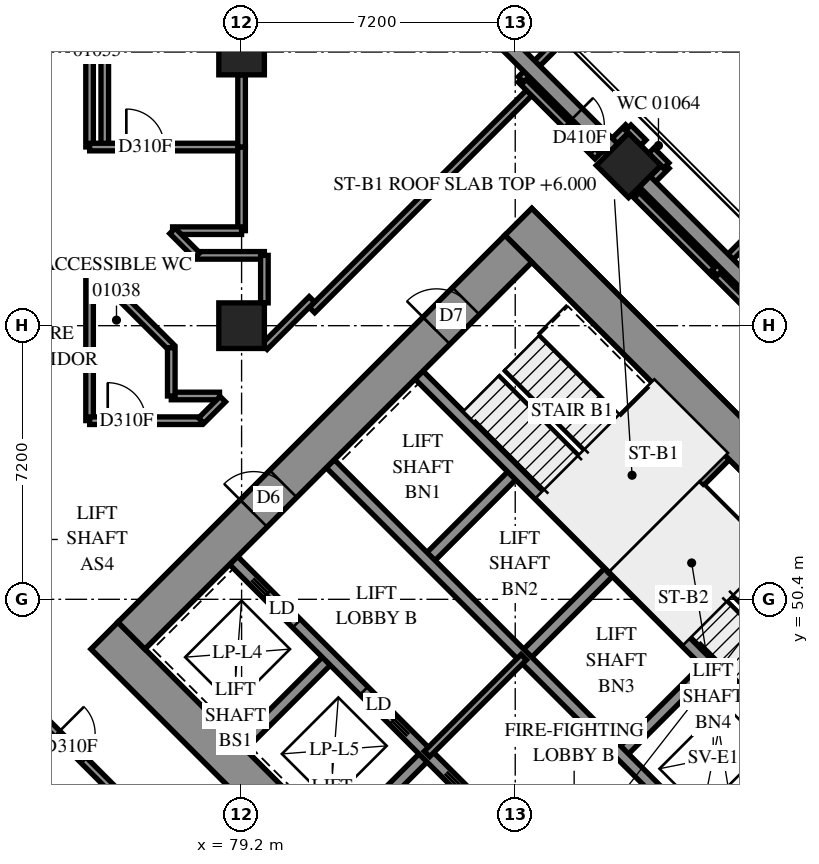
"""IFC4 building model, lengths in metres.
Left out: names, types, materials, properties, quantities, classifications, styles, units other than length and angle.
Written with IfcOpenShell. Run it as: python <this file> out.ifc"""

import sys

from ifc_helpers import new_model, si_unit, direction, frame, frame_2d, origin, origin_2d, place, context, subcontext, project, spatial, rectangle, extrude, element, fill, save


model = new_model("IFC4")
c1 = context("Model", 3, precision=1e-05, world=origin(), true_north=direction((0.0, 1.0)))
c2 = subcontext(c1, "Body", "Model", "MODEL_VIEW")
j1 = project(units=[si_unit("LENGTHUNIT", "METRE"), si_unit("PLANEANGLEUNIT", "RADIAN")], contexts=[c1])
p1 = place(None, origin())
s1 = spatial("IfcSite", under=j1, at=p1, CompositionType="ELEMENT")
p2 = place(p1, origin())
s2 = spatial("IfcBuilding", under=s1, at=p2, CompositionType="ELEMENT")
p3 = place(p2, frame((0.0, 0.0, 6.0)))
s3 = spatial("IfcBuildingStorey", under=s2, at=p3, CompositionType="ELEMENT", Elevation=6.0)
for number, where, z_axis, x_axis in (
    (1, (79.2, 57.6, 0.0), (0.0, 0.0, 1.0), (1.0, 0.0, 0.0)),
    (2, (79.2, 64.8, 0.0), (0.0, 0.0, 1.0), (1.0, 0.0, 0.0)),
    (3, (89.382, 61.818, 0.0), (0.0, 0.0, 1.0), (0.707, -0.707, 0.0)),
):
    element("IfcColumn", number, at=place(p3, frame(where, z_axis=z_axis, x_axis=x_axis)), inside=s3, PredefinedType="COLUMN", context=c2, shape_type="SweptSolid", body=[
        extrude(rectangle(XDim=1.2, YDim=1.2, at=origin_2d()), origin(), (0.0, 0.0, 1.0), 3.8),
    ])
p4 = place(p3, frame((75.594, 49.443, -0.4), z_axis=(0.0, 0.0, 1.0), x_axis=(0.7071037324, -0.70710983, 0.0)))
e4 = element("IfcWall", 4, at=p4, inside=s3, PredefinedType="SHEAR", context=c2, shape_type="SweptSolid", body=[
    extrude(rectangle(XDim=16.4, YDim=1.0, at=frame_2d((8.2, 0.0))), origin(), (0.0, 0.0, 1.0), 3.5),
])
p5 = place(p3, frame((86.483, 60.333, -0.4), z_axis=(0.0, 0.0, 1.0), x_axis=(0.70710983, -0.7071037324, 0.0)))
e5 = element("IfcWall", 5, at=p5, inside=s3, PredefinedType="SHEAR", context=c2, shape_type="SweptSolid", body=[
    extrude(rectangle(XDim=16.4, YDim=1.0, at=frame_2d((8.2, 0.0))), origin(), (0.0, 0.0, 1.0), 3.5),
])
p6 = place(p5, frame((11.0, 0.0, 0.4)))
e6 = element("IfcOpeningElement", 6, at=p6, cuts=e5, PredefinedType="OPENING", context=c2, shape_type="SweptSolid", body=[
    extrude(rectangle(XDim=0.8, YDim=2.1, at=frame_2d((0.4, 1.05))), frame((0.0, 0.51, 0.0), z_axis=(0.0, -1.0, 0.0), x_axis=(1.0, 0.0, 0.0)), (0.0, 0.0, 1.0), 1.02),
])
p7 = place(p3, frame((76.301, 49.443, -0.4), z_axis=(0.0, 0.0, 1.0), x_axis=(0.7071067812, 0.7071067812, 0.0)))
e7 = element("IfcWall", 7, at=p7, inside=s3, PredefinedType="SHEAR", context=c2, shape_type="SweptSolid", body=[
    extrude(rectangle(XDim=14.4, YDim=1.0, at=frame_2d((7.2, 0.0))), origin(), (0.0, 0.0, 1.0), 3.5),
])
p8 = place(p7, frame((4.55, 0.0, 0.4)))
e8 = element("IfcOpeningElement", 8, at=p8, cuts=e7, PredefinedType="OPENING", context=c2, shape_type="SweptSolid", body=[
    extrude(rectangle(XDim=1.1, YDim=2.1, at=frame_2d((0.55, 1.05))), frame((0.0, 0.51, 0.0), z_axis=(0.0, -1.0, 0.0), x_axis=(1.0, 0.0, 0.0)), (0.0, 0.0, 1.0), 1.02),
])
p9 = place(p7, frame((11.35, 0.0, 0.4)))
e9 = element("IfcOpeningElement", 9, at=p9, cuts=e7, PredefinedType="OPENING", context=c2, shape_type="SweptSolid", body=[
    extrude(rectangle(XDim=1.1, YDim=2.1, at=frame_2d((0.55, 1.05))), frame((0.0, 0.51, 0.0), z_axis=(0.0, -1.0, 0.0), x_axis=(1.0, 0.0, 0.0)), (0.0, 0.0, 1.0), 1.02),
])
p10 = place(p3, frame((87.19, 38.554, -0.4), z_axis=(0.0, 0.0, 1.0), x_axis=(0.707103309, 0.7071102534, 0.0)))
e10 = element("IfcWall", 10, at=p10, inside=s3, PredefinedType="SHEAR", context=c2, shape_type="SweptSolid", body=[
    extrude(rectangle(XDim=14.4, YDim=1.0, at=frame_2d((7.2, 0.0))), origin(), (0.0, 0.0, 1.0), 3.5),
])
p11 = place(p10, frame((4.55, 0.0, 0.4)))
e11 = element("IfcOpeningElement", 11, at=p11, cuts=e10, PredefinedType="OPENING", context=c2, shape_type="SweptSolid", body=[
    extrude(rectangle(XDim=1.1, YDim=2.1, at=frame_2d((0.55, 1.05))), frame((0.0, 0.51, 0.0), z_axis=(0.0, -1.0, 0.0), x_axis=(1.0, 0.0, 0.0)), (0.0, 0.0, 1.0), 1.02),
])
p12 = place(p10, frame((11.35, 0.0, 0.4)))
e12 = element("IfcOpeningElement", 12, at=p12, cuts=e10, PredefinedType="OPENING", context=c2, shape_type="SweptSolid", body=[
    extrude(rectangle(XDim=1.1, YDim=2.1, at=frame_2d((0.55, 1.05))), frame((0.0, 0.51, 0.0), z_axis=(0.0, -1.0, 0.0), x_axis=(1.0, 0.0, 0.0)), (0.0, 0.0, 1.0), 1.02),
])
for number, where, z_axis, x_axis in (
    (13, (79.2, 46.544, 0.0), (0.0, 0.0, 1.0), (0.707, 0.707, 0.0)),
    (14, (84.079, 51.423, 0.0), (0.0, 0.0, 1.0), (0.707, 0.707, 0.0)),
):
    element("IfcWall", number, at=place(p3, frame(where, z_axis=z_axis, x_axis=x_axis)), inside=s3, PredefinedType="SOLIDWALL", context=c2, shape_type="SweptSolid", body=[
        extrude(rectangle(XDim=3.3, YDim=0.3, at=frame_2d((1.65, 0.0))), origin(), (0.0, 0.0, 1.0), 3.8),
    ])
p13 = place(p3, frame((81.746, 43.999, 0.0), z_axis=(0.0, 0.0, 1.0), x_axis=(0.7071067812, 0.7071067812, 0.0)))
e15 = element("IfcWall", 15, at=p13, inside=s3, PredefinedType="SOLIDWALL", context=c2, shape_type="SweptSolid", body=[
    extrude(rectangle(XDim=3.3, YDim=0.3, at=frame_2d((1.65, 0.0))), origin(), (0.0, 0.0, 1.0), 3.8),
])
for number, where, z_axis, x_axis in (
    (16, (86.625, 48.878, 0.0), (0.0, 0.0, 1.0), (0.707, 0.707, 0.0)),
    (17, (89.17, 46.332, 0.0), (0.0, 0.0, 1.0), (0.707, 0.707, 0.0)),
):
    element("IfcWall", number, at=place(p3, frame(where, z_axis=z_axis, x_axis=x_axis)), inside=s3, PredefinedType="SOLIDWALL", context=c2, shape_type="SweptSolid", body=[
        extrude(rectangle(XDim=3.3, YDim=0.3, at=frame_2d((1.65, 0.0))), origin(), (0.0, 0.0, 1.0), 3.8),
    ])
p14 = place(p3, frame((78.988, 51.423, 0.0), z_axis=(0.0, 0.0, 1.0), x_axis=(0.7071067812, -0.7071067812, 0.0)))
e18 = element("IfcWall", 18, at=p14, inside=s3, PredefinedType="SOLIDWALL", context=c2, shape_type="SweptSolid", body=[
    extrude(rectangle(XDim=14.4, YDim=0.3, at=frame_2d((7.2, 0.0))), origin(), (0.0, 0.0, 1.0), 3.8),
])
p15 = place(p14, frame((1.25, 0.0, 0.0)))
e19 = element("IfcOpeningElement", 19, at=p15, cuts=e18, PredefinedType="OPENING", context=c2, shape_type="SweptSolid", body=[
    extrude(rectangle(XDim=1.1, YDim=2.1, at=frame_2d((0.55, 1.05))), frame((0.0, 0.16, 0.0), z_axis=(0.0, -1.0, 0.0), x_axis=(1.0, 0.0, 0.0)), (0.0, 0.0, 1.0), 0.32),
])
p16 = place(p14, frame((4.85, 0.0, 0.0)))
e20 = element("IfcOpeningElement", 20, at=p16, cuts=e18, PredefinedType="OPENING", context=c2, shape_type="SweptSolid", body=[
    extrude(rectangle(XDim=1.1, YDim=2.1, at=frame_2d((0.55, 1.05))), frame((0.0, 0.16, 0.0), z_axis=(0.0, -1.0, 0.0), x_axis=(1.0, 0.0, 0.0)), (0.0, 0.0, 1.0), 0.32),
])
p17 = place(p14, frame((8.45, 0.0, 0.0)))
e21 = element("IfcOpeningElement", 21, at=p17, cuts=e18, PredefinedType="OPENING", context=c2, shape_type="SweptSolid", body=[
    extrude(rectangle(XDim=1.1, YDim=2.1, at=frame_2d((0.55, 1.05))), frame((0.0, 0.16, 0.0), z_axis=(0.0, -1.0, 0.0), x_axis=(1.0, 0.0, 0.0)), (0.0, 0.0, 1.0), 0.32),
])
p18 = place(p14, frame((12.05, 0.0, 0.0)))
e22 = element("IfcOpeningElement", 22, at=p18, cuts=e18, PredefinedType="OPENING", context=c2, shape_type="SweptSolid", body=[
    extrude(rectangle(XDim=1.1, YDim=2.1, at=frame_2d((0.55, 1.05))), frame((0.0, 0.16, 0.0), z_axis=(0.0, -1.0, 0.0), x_axis=(1.0, 0.0, 0.0)), (0.0, 0.0, 1.0), 0.32),
])
p19 = place(p3, frame((81.534, 53.969, 0.0), z_axis=(0.0, 0.0, 1.0), x_axis=(0.707103309, -0.7071102534, 0.0)))
e23 = element("IfcWall", 23, at=p19, inside=s3, PredefinedType="SOLIDWALL", context=c2, shape_type="SweptSolid", body=[
    extrude(rectangle(XDim=14.4, YDim=0.3, at=frame_2d((7.2, 0.0))), origin(), (0.0, 0.0, 1.0), 3.8),
])
p20 = place(p19, frame((12.05, 0.0, 0.0)))
e24 = element("IfcOpeningElement", 24, at=p20, cuts=e23, PredefinedType="OPENING", context=c2, shape_type="SweptSolid", body=[
    extrude(rectangle(XDim=1.1, YDim=2.1, at=frame_2d((0.55, 1.05))), frame((0.0, 0.16, 0.0), z_axis=(0.0, -1.0, 0.0), x_axis=(1.0, 0.0, 0.0)), (0.0, 0.0, 1.0), 0.32),
])
for number, where, z_axis, x_axis in (
    (25, (83.867, 56.302, 0.0), (0.0, 0.0, 1.0), (0.707, -0.707, 0.0)),
    (26, (88.958, 51.211, 0.0), (0.0, 0.0, 1.0), (0.707, -0.707, 0.0)),
):
    element("IfcWall", number, at=place(p3, frame(where, z_axis=z_axis, x_axis=x_axis)), inside=s3, PredefinedType="SOLIDWALL", context=c2, shape_type="SweptSolid", body=[
        extrude(rectangle(XDim=7.2, YDim=0.3, at=frame_2d((3.6, 0.0))), origin(), (0.0, 0.0, 1.0), 3.8),
    ])
p21 = place(p3, frame((88.958, 51.211, 0.0), z_axis=(0.0, 0.0, 1.0), x_axis=(0.7071067812, 0.7071067812, 0.0)))
e27 = element("IfcWall", 27, at=p21, inside=s3, PredefinedType="SOLIDWALL", context=c2, shape_type="SweptSolid", body=[
    extrude(rectangle(XDim=4.2, YDim=0.3, at=frame_2d((2.1, 0.0))), origin(), (0.0, 0.0, 1.0), 3.8),
])
p22 = place(p3, frame((91.313, 53.354, 0.0), z_axis=(0.0, 0.0, 1.0), x_axis=(0.7071147811, -0.7070987812, 0.0)))
e28 = element("IfcWall", 28, at=p22, inside=s3, PredefinedType="PARTITIONING", context=c2, shape_type="SweptSolid", body=[
    extrude(rectangle(XDim=6.25, YDim=0.15, at=frame_2d((3.125, 0.0))), origin(), (0.0, 0.0, 1.0), 3.8),
])
p23 = place(p3, frame((84.079, 46.332, 0.0), z_axis=(0.0, 0.0, 1.0), x_axis=(0.7071067812, 0.7071067812, 0.0)))
e29 = element("IfcWall", 29, at=p23, inside=s3, PredefinedType="PARTITIONING", context=c2, shape_type="SweptSolid", body=[
    extrude(rectangle(XDim=3.6, YDim=0.2, at=frame_2d((1.8, 0.0))), origin(), (0.0, 0.0, 1.0), 3.8),
])
p24 = place(p3, frame((75.6, 62.3, 0.0), z_axis=(0.0, 0.0, 1.0), x_axis=(0.0, 1.0, 0.0)))
e30 = element("IfcWall", 30, at=p24, inside=s3, PredefinedType="PARTITIONING", context=c2, shape_type="SweptSolid", body=[
    extrude(rectangle(XDim=10.7, YDim=0.2, at=frame_2d((5.35, 0.0))), origin(), (0.0, 0.0, 1.0), 3.8),
])
p25 = place(p3, frame((81.053, 58.011, 0.0), z_axis=(0.0, 0.0, 1.0), x_axis=(0.7069845395, 0.7072290017, 0.0)))
e31 = element("IfcWall", 31, at=p25, inside=s3, PredefinedType="PARTITIONING", context=c2, shape_type="SweptSolid", body=[
    extrude(rectangle(XDim=8.181, YDim=0.2, at=frame_2d((4.091, 0.0))), origin(), (0.0, 0.0, 1.0), 3.8),
])
p26 = place(p3, frame((75.2, 62.302, 0.0), z_axis=(0.0, 0.0, 1.0), x_axis=(0.0, 1.0, 0.0)))
e32 = element("IfcWall", 32, at=p26, inside=s3, PredefinedType="PARTITIONING", context=c2, shape_type="SweptSolid", body=[
    extrude(rectangle(XDim=5.698, YDim=0.2, at=frame_2d((2.849, 0.0))), origin(), (0.0, 0.0, 1.0), 3.8),
])
p27 = place(p3, frame((74.015, 47.197, 0.0), z_axis=(0.0, 0.0, 1.0), x_axis=(0.7071067812, -0.7071067812, 0.0)))
e33 = element("IfcWall", 33, at=p27, inside=s3, PredefinedType="PARTITIONING", context=c2, shape_type="SweptSolid", body=[
    extrude(rectangle(XDim=4.712, YDim=0.2, at=frame_2d((2.356, 0.0))), origin(), (0.0, 0.0, 1.0), 3.8),
])
p28 = place(p27, frame((0.468, 0.0, 0.0)))
e34 = element("IfcOpeningElement", 34, at=p28, cuts=e33, PredefinedType="OPENING", context=c2, shape_type="SweptSolid", body=[
    extrude(rectangle(XDim=1.0, YDim=2.1, at=frame_2d((0.5, 1.05))), frame((0.0, 0.11, 0.0), z_axis=(0.0, -1.0, 0.0), x_axis=(1.0, 0.0, 0.0)), (0.0, 0.0, 1.0), 0.22),
])
p29 = place(p3, frame((75.2, 55.102, 0.0), z_axis=(0.0, 0.0, 1.0), x_axis=(0.0, 1.0, 0.0)))
e35 = element("IfcWall", 35, at=p29, inside=s3, PredefinedType="PARTITIONING", context=c2, shape_type="SweptSolid", body=[
    extrude(rectangle(XDim=4.066, YDim=0.2, at=frame_2d((2.033, 0.0))), origin(), (0.0, 0.0, 1.0), 3.8),
])
p30 = place(p3, frame((75.202, 62.3, 0.0), z_axis=(0.0, 0.0, 1.0), x_axis=(1.0, 0.0, 0.0)))
e36 = element("IfcWall", 36, at=p30, inside=s3, PredefinedType="PARTITIONING", context=c2, shape_type="SweptSolid", body=[
    extrude(rectangle(XDim=3.998, YDim=0.2, at=frame_2d((1.999, 0.0))), origin(), (0.0, 0.0, 1.0), 3.8),
])
p31 = place(p30, frame((0.966, 0.0, 0.0)))
e37 = element("IfcOpeningElement", 37, at=p31, cuts=e36, PredefinedType="OPENING", context=c2, shape_type="SweptSolid", body=[
    extrude(rectangle(XDim=1.0, YDim=2.1, at=frame_2d((0.5, 1.05))), frame((0.0, 0.11, 0.0), z_axis=(0.0, -1.0, 0.0), x_axis=(1.0, 0.0, 0.0)), (0.0, 0.0, 1.0), 0.22),
])
p32 = place(p3, frame((75.202, 55.1, 0.0), z_axis=(0.0, 0.0, 1.0), x_axis=(1.0, 0.0, 0.0)))
e38 = element("IfcWall", 38, at=p32, inside=s3, PredefinedType="PARTITIONING", context=c2, shape_type="SweptSolid", body=[
    extrude(rectangle(XDim=2.936, YDim=0.2, at=frame_2d((1.468, 0.0))), origin(), (0.0, 0.0, 1.0), 3.8),
])
p33 = place(p32, frame((0.475, 0.0, 0.0)))
e39 = element("IfcOpeningElement", 39, at=p33, cuts=e38, PredefinedType="OPENING", context=c2, shape_type="SweptSolid", body=[
    extrude(rectangle(XDim=1.0, YDim=2.1, at=frame_2d((0.5, 1.05))), frame((0.0, 0.11, 0.0), z_axis=(0.0, -1.0, 0.0), x_axis=(1.0, 0.0, 0.0)), (0.0, 0.0, 1.0), 0.22),
])
p34 = place(p3, frame((89.595, 61.033, 0.0), z_axis=(0.0, 0.0, 1.0), x_axis=(0.7074521324, -0.7067612612, 0.0)))
e40 = element("IfcWall", 40, at=p34, inside=s3, PredefinedType="PARTITIONING", context=c2, shape_type="SweptSolid", body=[
    extrude(rectangle(XDim=2.895, YDim=0.2, at=frame_2d((1.447, 0.0))), origin(), (0.0, 0.0, 1.0), 3.8),
])
p35 = place(p3, frame((91.648, 58.992, 0.0), z_axis=(0.0, 0.0, 1.0), x_axis=(0.7067612612, -0.7074521324, 0.0)))
e41 = element("IfcWall", 41, at=p35, inside=s3, PredefinedType="PARTITIONING", context=c2, shape_type="SweptSolid", body=[
    extrude(rectangle(XDim=2.895, YDim=0.2, at=frame_2d((1.447, 0.0))), origin(), (0.0, 0.0, 1.0), 3.8),
])
p36 = place(p35, frame((1.677, 0.0, 0.0)))
e42 = element("IfcOpeningElement", 42, at=p36, cuts=e41, PredefinedType="OPENING", context=c2, shape_type="SweptSolid", body=[
    extrude(rectangle(XDim=1.0, YDim=2.1, at=frame_2d((0.5, 1.05))), frame((0.0, 0.11, 0.0), z_axis=(0.0, -1.0, 0.0), x_axis=(1.0, 0.0, 0.0)), (0.0, 0.0, 1.0), 0.22),
])
p37 = place(p3, frame((86.551, 64.077, 0.0), z_axis=(0.0, 0.0, 1.0), x_axis=(0.7071067812, -0.7071067812, 0.0)))
e43 = element("IfcWall", 43, at=p37, inside=s3, PredefinedType="PARTITIONING", context=c2, shape_type="SweptSolid", body=[
    extrude(rectangle(XDim=2.854, YDim=0.2, at=frame_2d((1.427, 0.0))), origin(), (0.0, 0.0, 1.0), 3.8),
])
p38 = place(p37, frame((1.685, 0.0, 0.0)))
e44 = element("IfcOpeningElement", 44, at=p38, cuts=e43, PredefinedType="OPENING", context=c2, shape_type="SweptSolid", body=[
    extrude(rectangle(XDim=1.0, YDim=2.1, at=frame_2d((0.5, 1.05))), frame((0.0, 0.11, 0.0), z_axis=(0.0, -1.0, 0.0), x_axis=(1.0, 0.0, 0.0)), (0.0, 0.0, 1.0), 0.22),
])
p39 = place(p3, frame((79.2, 60.1, 0.0), z_axis=(0.0, 0.0, 1.0), x_axis=(0.0, 1.0, 0.0)))
e45 = element("IfcWall", 45, at=p39, inside=s3, PredefinedType="PARTITIONING", context=c2, shape_type="SweptSolid", body=[
    extrude(rectangle(XDim=2.2, YDim=0.2, at=frame_2d((1.1, 0.0))), origin(), (0.0, 0.0, 1.0), 3.8),
])
p40 = place(p3, frame((75.879, 58.497, 0.0), z_axis=(0.0, 0.0, 1.0), x_axis=(0.7075866635, -0.706626573, 0.0)))
e46 = element("IfcWall", 46, at=p40, inside=s3, PredefinedType="PARTITIONING", context=c2, shape_type="SweptSolid", body=[
    extrude(rectangle(XDim=2.083, YDim=0.2, at=frame_2d((1.042, 0.0))), origin(), (0.0, 0.0, 1.0), 3.8),
])
p41 = place(p3, frame((79.2, 62.3, 0.0), z_axis=(0.0, 0.0, 1.0), x_axis=(0.0, 1.0, 0.0)))
e47 = element("IfcWall", 47, at=p41, inside=s3, PredefinedType="PARTITIONING", context=c2, shape_type="SweptSolid", body=[
    extrude(rectangle(XDim=1.9, YDim=0.2, at=frame_2d((0.95, 0.0))), origin(), (0.0, 0.0, 1.0), 3.8),
])
p42 = place(p3, frame((77.384, 60.1, 0.0), z_axis=(0.0, 0.0, 1.0), x_axis=(1.0, 0.0, 0.0)))
e48 = element("IfcWall", 48, at=p42, inside=s3, PredefinedType="PARTITIONING", context=c2, shape_type="SweptSolid", body=[
    extrude(rectangle(XDim=1.816, YDim=0.2, at=frame_2d((0.908, 0.0))), origin(), (0.0, 0.0, 1.0), 3.8),
])
p43 = place(p3, frame((78.032, 59.45, 0.0), z_axis=(0.0, 0.0, 1.0), x_axis=(1.0, 0.0, 0.0)))
e49 = element("IfcWall", 49, at=p43, inside=s3, PredefinedType="PARTITIONING", context=c2, shape_type="SweptSolid", body=[
    extrude(rectangle(XDim=1.768, YDim=0.2, at=frame_2d((0.884, 0.0))), origin(), (0.0, 0.0, 1.0), 3.8),
])
p44 = place(p3, frame((79.801, 57.047, 0.0), z_axis=(0.0, 0.0, 1.0), x_axis=(0.7071067812, 0.7071067812, 0.0)))
e50 = element("IfcWall", 50, at=p44, inside=s3, PredefinedType="PARTITIONING", context=c2, shape_type="SweptSolid", body=[
    extrude(rectangle(XDim=1.765, YDim=0.2, at=frame_2d((0.882, 0.0))), origin(), (0.0, 0.0, 1.0), 3.8),
])
p45 = place(p3, frame((86.551, 64.077, 0.0), z_axis=(0.0, 0.0, 1.0), x_axis=(0.7063607097, 0.7078520663, 0.0)))
e51 = element("IfcWall", 51, at=p45, inside=s3, PredefinedType="PARTITIONING", context=c2, shape_type="SweptSolid", body=[
    extrude(rectangle(XDim=1.475, YDim=0.2, at=frame_2d((0.738, 0.0))), origin(), (0.0, 0.0, 1.0), 3.8),
])
p46 = place(p3, frame((91.645, 58.991, 0.0), z_axis=(0.0, 0.0, 1.0), x_axis=(0.7071067812, 0.7071067812, 0.0)))
e52 = element("IfcWall", 52, at=p46, inside=s3, PredefinedType="PARTITIONING", context=c2, shape_type="SweptSolid", body=[
    extrude(rectangle(XDim=1.468, YDim=0.2, at=frame_2d((0.734, 0.0))), origin(), (0.0, 0.0, 1.0), 3.8),
])
for number, where, z_axis, x_axis in (
    (53, (77.35, 55.75, 0.0), (0.0, 0.0, 1.0), (1.0, 0.0, 0.0)),
    (54, (77.35, 55.75, 0.0), (0.0, 0.0, 1.0), (0.0, 1.0, 0.0)),
):
    element("IfcWall", number, at=place(p3, frame(where, z_axis=z_axis, x_axis=x_axis)), inside=s3, PredefinedType="PARTITIONING", context=c2, shape_type="SweptSolid", body=[
        extrude(rectangle(XDim=1.27, YDim=0.2, at=frame_2d((0.635, 0.0))), origin(), (0.0, 0.0, 1.0), 3.8),
    ])
p47 = place(p3, frame((79.8, 58.2, 0.0), z_axis=(0.0, 0.0, 1.0), x_axis=(0.0, 1.0, 0.0)))
e55 = element("IfcWall", 55, at=p47, inside=s3, PredefinedType="PARTITIONING", context=c2, shape_type="SweptSolid", body=[
    extrude(rectangle(XDim=1.25, YDim=0.2, at=frame_2d((0.625, 0.0))), origin(), (0.0, 0.0, 1.0), 3.8),
])
p48 = place(p3, frame((77.381, 60.095, 0.0), z_axis=(0.0, 0.0, 1.0), x_axis=(0.7071067812, -0.7071067812, 0.0)))
e56 = element("IfcWall", 56, at=p48, inside=s3, PredefinedType="PARTITIONING", context=c2, shape_type="SweptSolid", body=[
    extrude(rectangle(XDim=0.916, YDim=0.2, at=frame_2d((0.458, 0.0))), origin(), (0.0, 0.0, 1.0), 3.8),
])
p49 = place(p3, frame((78.139, 55.101, 0.0), z_axis=(0.0, 0.0, 1.0), x_axis=(0.7071067812, 0.7071067812, 0.0)))
e57 = element("IfcWall", 57, at=p49, inside=s3, PredefinedType="PARTITIONING", context=c2, shape_type="SweptSolid", body=[
    extrude(rectangle(XDim=0.8, YDim=0.2, at=frame_2d((0.4, 0.0))), origin(), (0.0, 0.0, 1.0), 3.8),
])
p50 = place(p3, frame((75.397, 58.967, 0.0), z_axis=(0.0, 0.0, 1.0), x_axis=(0.7071067812, -0.7071067812, 0.0)))
e58 = element("IfcWall", 58, at=p50, inside=s3, PredefinedType="PARTITIONING", context=c2, shape_type="SweptSolid", body=[
    extrude(rectangle(XDim=0.673, YDim=0.2, at=frame_2d((0.337, 0.0))), origin(), (0.0, 0.0, 1.0), 3.8),
])
for number, where, z_axis, x_axis in (
    (59, (89.985, 61.417, 0.0), (0.0, 0.0, 1.0), (0.707, 0.707, 0.0)),
    (60, (89.979, 62.205, 0.0), (0.0, 0.0, 1.0), (0.707, -0.707, 0.0)),
    (61, (88.981, 62.422, 0.0), (0.0, 0.0, 1.0), (0.707, 0.707, 0.0)),
    (62, (89.375, 62.809, 0.0), (0.0, 0.0, 1.0), (0.707, -0.707, 0.0)),
):
    element("IfcWall", number, at=place(p3, frame(where, z_axis=z_axis, x_axis=x_axis)), inside=s3, PredefinedType="PARTITIONING", context=c2, shape_type="SweptSolid", body=[
        extrude(rectangle(XDim=0.557, YDim=0.2, at=frame_2d((0.279, 0.0))), origin(), (0.0, 0.0, 1.0), 3.8),
    ])
p51 = place(p8, origin())
e63 = element("IfcDoor", 63, at=p51, inside=s3, OperationType="DOUBLE_DOOR_SINGLE_SWING", PredefinedType="DOOR", context=c2, shape_type="SweptSolid", body=[
    extrude(rectangle(XDim=1.1, YDim=2.1, at=frame_2d((0.55, 1.05))), frame((0.0, 0.025, 0.0), z_axis=(0.0, -1.0, 0.0), x_axis=(1.0, 0.0, 0.0)), (0.0, 0.0, 1.0), 0.05),
])
fill(e8, e63)
p52 = place(p9, origin())
e64 = element("IfcDoor", 64, at=p52, inside=s3, OperationType="SINGLE_SWING_LEFT", PredefinedType="DOOR", context=c2, shape_type="SweptSolid", body=[
    extrude(rectangle(XDim=1.1, YDim=2.1, at=frame_2d((0.55, 1.05))), frame((0.0, 0.025, 0.0), z_axis=(0.0, -1.0, 0.0), x_axis=(1.0, 0.0, 0.0)), (0.0, 0.0, 1.0), 0.05),
])
fill(e9, e64)
p53 = place(p15, origin())
e65 = element("IfcDoor", 65, at=p53, inside=s3, OperationType="SLIDING_TO_LEFT", PredefinedType="DOOR", context=c2, shape_type="SweptSolid", body=[
    extrude(rectangle(XDim=1.1, YDim=2.1, at=frame_2d((0.55, 1.05))), frame((0.0, 0.025, 0.0), z_axis=(0.0, -1.0, 0.0), x_axis=(1.0, 0.0, 0.0)), (0.0, 0.0, 1.0), 0.05),
])
fill(e19, e65)
p54 = place(p16, origin())
e66 = element("IfcDoor", 66, at=p54, inside=s3, OperationType="SLIDING_TO_RIGHT", PredefinedType="DOOR", context=c2, shape_type="SweptSolid", body=[
    extrude(rectangle(XDim=1.1, YDim=2.1, at=frame_2d((0.55, 1.05))), frame((0.0, 0.025, 0.0), z_axis=(0.0, -1.0, 0.0), x_axis=(1.0, 0.0, 0.0)), (0.0, 0.0, 1.0), 0.05),
])
fill(e20, e66)
p55 = place(p28, origin())
e67 = element("IfcDoor", 67, at=p55, inside=s3, OperationType="SINGLE_SWING_LEFT", PredefinedType="DOOR", context=c2, shape_type="SweptSolid", body=[
    extrude(rectangle(XDim=1.0, YDim=2.1, at=frame_2d((0.5, 1.05))), frame((0.0, 0.025, 0.0), z_axis=(0.0, -1.0, 0.0), x_axis=(1.0, 0.0, 0.0)), (0.0, 0.0, 1.0), 0.05),
])
fill(e34, e67)
p56 = place(p33, origin())
e68 = element("IfcDoor", 68, at=p56, inside=s3, OperationType="SINGLE_SWING_LEFT", PredefinedType="DOOR", context=c2, shape_type="SweptSolid", body=[
    extrude(rectangle(XDim=1.0, YDim=2.1, at=frame_2d((0.5, 1.05))), frame((0.0, 0.025, 0.0), z_axis=(0.0, -1.0, 0.0), x_axis=(1.0, 0.0, 0.0)), (0.0, 0.0, 1.0), 0.05),
])
fill(e39, e68)
p57 = place(p31, origin())
e69 = element("IfcDoor", 69, at=p57, inside=s3, OperationType="SINGLE_SWING_LEFT", PredefinedType="DOOR", context=c2, shape_type="SweptSolid", body=[
    extrude(rectangle(XDim=1.0, YDim=2.1, at=frame_2d((0.5, 1.05))), frame((0.0, 0.025, 0.0), z_axis=(0.0, -1.0, 0.0), x_axis=(1.0, 0.0, 0.0)), (0.0, 0.0, 1.0), 0.05),
])
fill(e37, e69)
p58 = place(p38, origin())
e70 = element("IfcDoor", 70, at=p58, inside=s3, OperationType="SINGLE_SWING_RIGHT", PredefinedType="DOOR", context=c2, shape_type="SweptSolid", body=[
    extrude(rectangle(XDim=1.0, YDim=2.1, at=frame_2d((0.5, 1.05))), frame((0.0, 0.025, 0.0), z_axis=(0.0, -1.0, 0.0), x_axis=(1.0, 0.0, 0.0)), (0.0, 0.0, 1.0), 0.05),
])
fill(e44, e70)
save(model, sys.argv[1])
